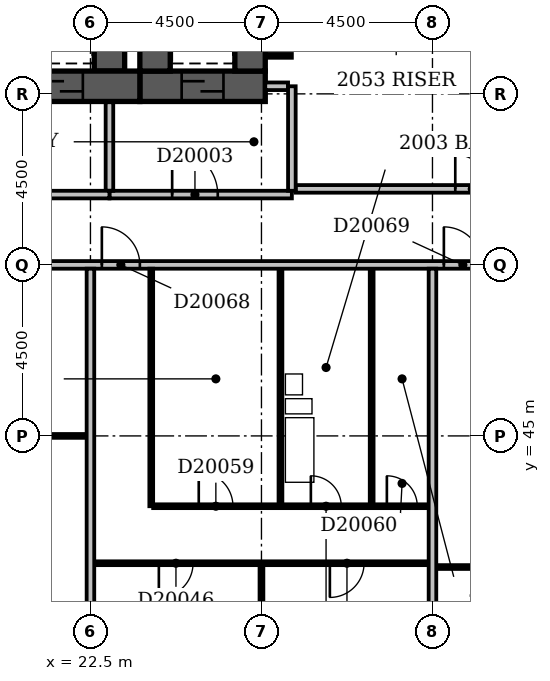
"""IFC4 building model, lengths in metres.
Left out: names, types, materials, properties, quantities, classifications, styles, units other than length and angle.
Written with IfcOpenShell. Run it as: python <this file> out.ifc"""

import sys

from ifc_helpers import new_model, si_unit, direction, frame, frame_2d, origin, place, context, subcontext, project, spatial, rectangle, extrude, element, fill, save


model = new_model("IFC4")
c1 = context("Model", 3, precision=1e-05, world=origin(), true_north=direction((0.0, 1.0)))
c2 = subcontext(c1, "Body", "Model", "MODEL_VIEW")
j1 = project(units=[si_unit("LENGTHUNIT", "METRE"), si_unit("PLANEANGLEUNIT", "RADIAN")], contexts=[c1])
p1 = place(None, origin())
s1 = spatial("IfcSite", under=j1, at=p1, CompositionType="ELEMENT")
p2 = place(p1, origin())
s2 = spatial("IfcBuilding", under=s1, at=p2, CompositionType="ELEMENT")
p3 = place(p2, frame((0.0, 0.0, 83.0)))
s3 = spatial("IfcBuildingStorey", under=s2, at=p3, CompositionType="ELEMENT", Elevation=83.0)
p4 = place(p3, frame((7.35, 54.2, -0.3), z_axis=(0.0, 0.0, 1.0), x_axis=(1.0, 0.0, 0.0)))
e1 = element("IfcWall", 1, at=p4, inside=s3, PredefinedType="SHEAR", context=c2, shape_type="SweptSolid", body=[
    extrude(rectangle(XDim=16.45, YDim=0.8, at=frame_2d((8.225, 0.0))), origin(), (0.0, 0.0, 1.0), 3.6),
])
p5 = place(p4, frame((1.35, 0.0, 0.3)))
e2 = element("IfcOpeningElement", 2, at=p5, cuts=e1, PredefinedType="OPENING", context=c2, shape_type="SweptSolid", body=[
    extrude(rectangle(XDim=1.1, YDim=2.1, at=frame_2d((0.55, 1.05))), frame((0.0, 0.412, 0.0), z_axis=(0.0, -1.0, 0.0), x_axis=(1.0, 0.0, 0.0)), (0.0, 0.0, 1.0), 0.824),
])
p6 = place(p4, frame((3.85, 0.0, 0.3)))
e3 = element("IfcOpeningElement", 3, at=p6, cuts=e1, PredefinedType="OPENING", context=c2, shape_type="SweptSolid", body=[
    extrude(rectangle(XDim=1.1, YDim=2.1, at=frame_2d((0.55, 1.05))), frame((0.0, 0.412, 0.0), z_axis=(0.0, -1.0, 0.0), x_axis=(1.0, 0.0, 0.0)), (0.0, 0.0, 1.0), 0.824),
])
p7 = place(p4, frame((6.35, 0.0, 0.3)))
e4 = element("IfcOpeningElement", 4, at=p7, cuts=e1, PredefinedType="OPENING", context=c2, shape_type="SweptSolid", body=[
    extrude(rectangle(XDim=1.1, YDim=2.1, at=frame_2d((0.55, 1.05))), frame((0.0, 0.412, 0.0), z_axis=(0.0, -1.0, 0.0), x_axis=(1.0, 0.0, 0.0)), (0.0, 0.0, 1.0), 0.824),
])
p8 = place(p4, frame((8.85, 0.0, 0.3)))
e5 = element("IfcOpeningElement", 5, at=p8, cuts=e1, PredefinedType="OPENING", context=c2, shape_type="SweptSolid", body=[
    extrude(rectangle(XDim=1.1, YDim=2.1, at=frame_2d((0.55, 1.05))), frame((0.0, 0.412, 0.0), z_axis=(0.0, -1.0, 0.0), x_axis=(1.0, 0.0, 0.0)), (0.0, 0.0, 1.0), 0.824),
])
p9 = place(p4, frame((11.35, 0.0, 0.3)))
e6 = element("IfcOpeningElement", 6, at=p9, cuts=e1, PredefinedType="OPENING", context=c2, shape_type="SweptSolid", body=[
    extrude(rectangle(XDim=1.1, YDim=2.1, at=frame_2d((0.55, 1.05))), frame((0.0, 0.412, 0.0), z_axis=(0.0, -1.0, 0.0), x_axis=(1.0, 0.0, 0.0)), (0.0, 0.0, 1.0), 0.824),
])
p10 = place(p4, frame((13.85, 0.0, 0.3)))
e7 = element("IfcOpeningElement", 7, at=p10, cuts=e1, PredefinedType="OPENING", context=c2, shape_type="SweptSolid", body=[
    extrude(rectangle(XDim=1.1, YDim=2.1, at=frame_2d((0.55, 1.05))), frame((0.0, 0.412, 0.0), z_axis=(0.0, -1.0, 0.0), x_axis=(1.0, 0.0, 0.0)), (0.0, 0.0, 1.0), 0.824),
])
p11 = place(p3, frame((23.0, 54.6, -0.3), z_axis=(0.0, 0.0, 1.0), x_axis=(0.0, 1.0, 0.0)))
e8 = element("IfcWall", 8, at=p11, inside=s3, PredefinedType="SHEAR", context=c2, shape_type="SweptSolid", body=[
    extrude(rectangle(XDim=3.0, YDim=0.8, at=frame_2d((1.5, 0.0))), origin(), (0.0, 0.0, 1.0), 3.6),
])
p12 = place(p3, frame((23.8, 54.2, -0.3), z_axis=(0.0, 0.0, 1.0), x_axis=(1.0, 0.0, 0.0)))
e9 = element("IfcWall", 9, at=p12, inside=s3, PredefinedType="SHEAR", context=c2, shape_type="SweptSolid", body=[
    extrude(rectangle(XDim=3.3, YDim=0.8, at=frame_2d((1.65, 0.0))), origin(), (0.0, 0.0, 1.0), 3.6),
])
p13 = place(p12, frame((1.1, 0.0, 0.3)))
e10 = element("IfcOpeningElement", 10, at=p13, cuts=e9, PredefinedType="OPENING", context=c2, shape_type="SweptSolid", body=[
    extrude(rectangle(XDim=1.1, YDim=2.1, at=frame_2d((0.55, 1.05))), frame((0.0, 0.412, 0.0), z_axis=(0.0, -1.0, 0.0), x_axis=(1.0, 0.0, 0.0)), (0.0, 0.0, 1.0), 0.824),
])
for number, where, z_axis, x_axis in (
    (11, (24.2, 54.6, -0.3), (0.0, 0.0, 1.0), (0.0, 1.0, 0.0)),
    (12, (26.7, 54.6, -0.3), (0.0, 0.0, 1.0), (0.0, 1.0, 0.0)),
):
    element("IfcWall", number, at=place(p3, frame(where, z_axis=z_axis, x_axis=x_axis)), inside=s3, PredefinedType="SHEAR", context=c2, shape_type="SweptSolid", body=[
        extrude(rectangle(XDim=3.0, YDim=0.8, at=frame_2d((1.5, 0.0))), origin(), (0.0, 0.0, 1.0), 3.6),
    ])
p14 = place(p3, frame((8.0, 51.35, 0.0), z_axis=(0.0, 0.0, 1.0), x_axis=(1.0, 0.0, 0.0)))
e13 = element("IfcWall", 13, at=p14, inside=s3, PredefinedType="PARTITIONING", context=c2, shape_type="SweptSolid", body=[
    extrude(rectangle(XDim=15.0, YDim=0.2, at=frame_2d((7.5, 0.0))), origin(), (0.0, 0.0, 1.0), 3.3),
])
p15 = place(p14, frame((3.4, 0.0, 0.0)))
e14 = element("IfcOpeningElement", 14, at=p15, cuts=e13, PredefinedType="OPENING", context=c2, shape_type="SweptSolid", body=[
    extrude(rectangle(XDim=1.2, YDim=2.1, at=frame_2d((0.6, 1.05))), frame((0.0, 0.112, 0.0), z_axis=(0.0, -1.0, 0.0), x_axis=(1.0, 0.0, 0.0)), (0.0, 0.0, 1.0), 0.224),
])
p16 = place(p14, frame((9.4, 0.0, 0.0)))
e15 = element("IfcOpeningElement", 15, at=p16, cuts=e13, PredefinedType="OPENING", context=c2, shape_type="SweptSolid", body=[
    extrude(rectangle(XDim=1.2, YDim=2.1, at=frame_2d((0.6, 1.05))), frame((0.0, 0.112, 0.0), z_axis=(0.0, -1.0, 0.0), x_axis=(1.0, 0.0, 0.0)), (0.0, 0.0, 1.0), 0.224),
])
p17 = place(p3, frame((23.0, 51.45, 0.0), z_axis=(0.0, 0.0, 1.0), x_axis=(0.0, 1.0, 0.0)))
e16 = element("IfcWall", 16, at=p17, inside=s3, PredefinedType="PARTITIONING", context=c2, shape_type="SweptSolid", body=[
    extrude(rectangle(XDim=2.33, YDim=0.2, at=frame_2d((1.165, 0.0))), origin(), (0.0, 0.0, 1.0), 3.3),
])
p18 = place(p3, frame((23.0, 51.35, 0.0), z_axis=(0.0, 0.0, 1.0), x_axis=(1.0, 0.0, 0.0)))
e17 = element("IfcWall", 17, at=p18, inside=s3, PredefinedType="PARTITIONING", context=c2, shape_type="SweptSolid", body=[
    extrude(rectangle(XDim=4.8, YDim=0.2, at=frame_2d((2.4, 0.0))), origin(), (0.0, 0.0, 1.0), 3.3),
])
p19 = place(p18, frame((1.65, 0.0, 0.0)))
e18 = element("IfcOpeningElement", 18, at=p19, cuts=e17, PredefinedType="OPENING", context=c2, shape_type="SweptSolid", body=[
    extrude(rectangle(XDim=1.2, YDim=2.1, at=frame_2d((0.6, 1.05))), frame((0.0, 0.112, 0.0), z_axis=(0.0, -1.0, 0.0), x_axis=(1.0, 0.0, 0.0)), (0.0, 0.0, 1.0), 0.224),
])
p20 = place(p3, frame((27.8, 51.45, 0.0), z_axis=(0.0, 0.0, 1.0), x_axis=(0.0, 1.0, 0.0)))
e19 = element("IfcWall", 19, at=p20, inside=s3, PredefinedType="PARTITIONING", context=c2, shape_type="SweptSolid", body=[
    extrude(rectangle(XDim=2.75, YDim=0.2, at=frame_2d((1.375, 0.0))), origin(), (0.0, 0.0, 1.0), 3.3),
])
p21 = place(p3, frame((27.1, 54.2, 0.0), z_axis=(0.0, 0.0, 1.0), x_axis=(1.0, 0.0, 0.0)))
e20 = element("IfcWall", 20, at=p21, inside=s3, PredefinedType="PARTITIONING", context=c2, shape_type="SweptSolid", body=[
    extrude(rectangle(XDim=0.6, YDim=0.2, at=frame_2d((0.3, 0.0))), origin(), (0.0, 0.0, 1.0), 3.3),
])
p22 = place(p3, frame((22.5, 36.6, 0.0), z_axis=(0.0, 0.0, 1.0), x_axis=(0.0, 1.0, 0.0)))
e21 = element("IfcWall", 21, at=p22, inside=s3, PredefinedType="PARTITIONING", context=c2, shape_type="SweptSolid", body=[
    extrude(rectangle(XDim=12.8, YDim=0.2, at=frame_2d((6.4, 0.0))), origin(), (0.0, 0.0, 1.0), 3.3),
])
p23 = place(p3, frame((27.0, 36.6, 0.0), z_axis=(0.0, 0.0, 1.0), x_axis=(0.0, 1.0, 0.0)))
e22 = element("IfcWall", 22, at=p23, inside=s3, PredefinedType="PARTITIONING", context=c2, shape_type="SweptSolid", body=[
    extrude(rectangle(XDim=5.0, YDim=0.1, at=frame_2d((2.5, 0.0))), origin(), (0.0, 0.0, 1.0), 2.6),
])
p24 = place(p3, frame((31.5, 36.6, 0.0), z_axis=(0.0, 0.0, 1.0), x_axis=(0.0, 1.0, 0.0)))
e23 = element("IfcWall", 23, at=p24, inside=s3, PredefinedType="PARTITIONING", context=c2, shape_type="SweptSolid", body=[
    extrude(rectangle(XDim=12.8, YDim=0.2, at=frame_2d((6.4, 0.0))), origin(), (0.0, 0.0, 1.0), 3.3),
])
p25 = place(p3, frame((31.6, 41.55, 0.0), z_axis=(0.0, 0.0, 1.0), x_axis=(1.0, 0.0, 0.0)))
e24 = element("IfcWall", 24, at=p25, inside=s3, PredefinedType="PARTITIONING", context=c2, shape_type="SweptSolid", body=[
    extrude(rectangle(XDim=13.3, YDim=0.1, at=frame_2d((6.65, 0.0))), origin(), (0.0, 0.0, 1.0), 3.3),
])
p26 = place(p25, frame((3.9, 0.0, 0.0)))
e25 = element("IfcOpeningElement", 25, at=p26, cuts=e24, PredefinedType="OPENING", context=c2, shape_type="SweptSolid", body=[
    extrude(rectangle(XDim=0.9, YDim=2.1, at=frame_2d((0.45, 1.05))), frame((0.0, 0.062, 0.0), z_axis=(0.0, -1.0, 0.0), x_axis=(1.0, 0.0, 0.0)), (0.0, 0.0, 1.0), 0.124),
])
p27 = place(p25, frame((10.7, 0.0, 0.0)))
e26 = element("IfcOpeningElement", 26, at=p27, cuts=e24, PredefinedType="OPENING", context=c2, shape_type="SweptSolid", body=[
    extrude(rectangle(XDim=0.9, YDim=2.1, at=frame_2d((0.45, 1.05))), frame((0.0, 0.062, 0.0), z_axis=(0.0, -1.0, 0.0), x_axis=(1.0, 0.0, 0.0)), (0.0, 0.0, 1.0), 0.124),
])
p28 = place(p3, frame((22.6, 41.65, 0.0), z_axis=(0.0, 0.0, 1.0), x_axis=(1.0, 0.0, 0.0)))
e27 = element("IfcWall", 27, at=p28, inside=s3, PredefinedType="PARTITIONING", context=c2, shape_type="SweptSolid", body=[
    extrude(rectangle(XDim=8.8, YDim=0.1, at=frame_2d((4.4, 0.0))), origin(), (0.0, 0.0, 1.0), 3.3),
])
p29 = place(p28, frame((1.7, 0.0, 0.0)))
e28 = element("IfcOpeningElement", 28, at=p29, cuts=e27, PredefinedType="OPENING", context=c2, shape_type="SweptSolid", body=[
    extrude(rectangle(XDim=0.9, YDim=2.1, at=frame_2d((0.45, 1.05))), frame((0.0, 0.062, 0.0), z_axis=(0.0, -1.0, 0.0), x_axis=(1.0, 0.0, 0.0)), (0.0, 0.0, 1.0), 0.124),
])
p30 = place(p28, frame((6.2, 0.0, 0.0)))
e29 = element("IfcOpeningElement", 29, at=p30, cuts=e27, PredefinedType="OPENING", context=c2, shape_type="SweptSolid", body=[
    extrude(rectangle(XDim=0.9, YDim=2.1, at=frame_2d((0.45, 1.05))), frame((0.0, 0.062, 0.0), z_axis=(0.0, -1.0, 0.0), x_axis=(1.0, 0.0, 0.0)), (0.0, 0.0, 1.0), 0.124),
])
p31 = place(p3, frame((24.1, 43.15, 0.0), z_axis=(0.0, 0.0, 1.0), x_axis=(0.0, 1.0, 0.0)))
e30 = element("IfcWall", 30, at=p31, inside=s3, PredefinedType="PARTITIONING", context=c2, shape_type="SweptSolid", body=[
    extrude(rectangle(XDim=6.25, YDim=0.1, at=frame_2d((3.125, 0.0))), origin(), (0.0, 0.0, 1.0), 3.3),
])
p32 = place(p3, frame((24.15, 43.15, 0.0), z_axis=(0.0, 0.0, 1.0), x_axis=(1.0, 0.0, 0.0)))
e31 = element("IfcWall", 31, at=p32, inside=s3, PredefinedType="PARTITIONING", context=c2, shape_type="SweptSolid", body=[
    extrude(rectangle(XDim=7.25, YDim=0.1, at=frame_2d((3.625, 0.0))), origin(), (0.0, 0.0, 1.0), 3.3),
])
p33 = place(p32, frame((4.15, 0.0, 0.0)))
e32 = element("IfcOpeningElement", 32, at=p33, cuts=e31, PredefinedType="OPENING", context=c2, shape_type="SweptSolid", body=[
    extrude(rectangle(XDim=0.8, YDim=2.1, at=frame_2d((0.4, 1.05))), frame((0.0, 0.062, 0.0), z_axis=(0.0, -1.0, 0.0), x_axis=(1.0, 0.0, 0.0)), (0.0, 0.0, 1.0), 0.124),
])
p34 = place(p32, frame((1.2, 0.0, 0.0)))
e33 = element("IfcOpeningElement", 33, at=p34, cuts=e31, PredefinedType="OPENING", context=c2, shape_type="SweptSolid", body=[
    extrude(rectangle(XDim=0.9, YDim=2.1, at=frame_2d((0.45, 1.05))), frame((0.0, 0.062, 0.0), z_axis=(0.0, -1.0, 0.0), x_axis=(1.0, 0.0, 0.0)), (0.0, 0.0, 1.0), 0.124),
])
p35 = place(p32, frame((6.15, 0.0, 0.0)))
e34 = element("IfcOpeningElement", 34, at=p35, cuts=e31, PredefinedType="OPENING", context=c2, shape_type="SweptSolid", body=[
    extrude(rectangle(XDim=0.8, YDim=2.1, at=frame_2d((0.4, 1.05))), frame((0.0, 0.062, 0.0), z_axis=(0.0, -1.0, 0.0), x_axis=(1.0, 0.0, 0.0)), (0.0, 0.0, 1.0), 0.124),
])
p36 = place(p3, frame((27.5, 43.2, 0.0), z_axis=(0.0, 0.0, 1.0), x_axis=(0.0, 1.0, 0.0)))
e35 = element("IfcWall", 35, at=p36, inside=s3, PredefinedType="PLUMBINGWALL", context=c2, shape_type="SweptSolid", body=[
    extrude(rectangle(XDim=6.2, YDim=0.1, at=frame_2d((3.1, 0.0))), origin(), (0.0, 0.0, 1.0), 2.6),
])
p37 = place(p3, frame((29.9, 43.2, 0.0), z_axis=(0.0, 0.0, 1.0), x_axis=(0.0, 1.0, 0.0)))
e36 = element("IfcWall", 36, at=p37, inside=s3, PredefinedType="PLUMBINGWALL", context=c2, shape_type="SweptSolid", body=[
    extrude(rectangle(XDim=6.2, YDim=0.1, at=frame_2d((3.1, 0.0))), origin(), (0.0, 0.0, 1.0), 3.3),
])
p38 = place(p3, frame((9.1, 45.0, 0.0), z_axis=(0.0, 0.0, 1.0), x_axis=(1.0, 0.0, 0.0)))
e37 = element("IfcWall", 37, at=p38, inside=s3, PredefinedType="PARTITIONING", context=c2, shape_type="SweptSolid", body=[
    extrude(rectangle(XDim=13.3, YDim=0.1, at=frame_2d((6.65, 0.0))), origin(), (0.0, 0.0, 1.0), 3.3),
])
p39 = place(p3, frame((9.1, 49.5, 0.0), z_axis=(0.0, 0.0, 1.0), x_axis=(1.0, 0.0, 0.0)))
e38 = element("IfcWall", 38, at=p39, inside=s3, PredefinedType="PARTITIONING", context=c2, shape_type="SweptSolid", body=[
    extrude(rectangle(XDim=57.8, YDim=0.2, at=frame_2d((28.9, 0.0))), origin(), (0.0, 0.0, 1.0), 3.3),
])
p40 = place(p39, frame((13.7, 0.0, 0.0)))
e39 = element("IfcOpeningElement", 39, at=p40, cuts=e38, PredefinedType="OPENING", context=c2, shape_type="SweptSolid", body=[
    extrude(rectangle(XDim=1.0, YDim=2.1, at=frame_2d((0.5, 1.05))), frame((0.0, 0.112, 0.0), z_axis=(0.0, -1.0, 0.0), x_axis=(1.0, 0.0, 0.0)), (0.0, 0.0, 1.0), 0.224),
])
p41 = place(p39, frame((22.7, 0.0, 0.0)))
e40 = element("IfcOpeningElement", 40, at=p41, cuts=e38, PredefinedType="OPENING", context=c2, shape_type="SweptSolid", body=[
    extrude(rectangle(XDim=1.0, YDim=2.1, at=frame_2d((0.5, 1.05))), frame((0.0, 0.112, 0.0), z_axis=(0.0, -1.0, 0.0), x_axis=(1.0, 0.0, 0.0)), (0.0, 0.0, 1.0), 0.224),
])
p42 = place(p39, frame((38.6, 0.0, 0.0)))
e41 = element("IfcOpeningElement", 41, at=p42, cuts=e38, PredefinedType="OPENING", context=c2, shape_type="SweptSolid", body=[
    extrude(rectangle(XDim=1.0, YDim=2.1, at=frame_2d((0.5, 1.05))), frame((0.0, 0.112, 0.0), z_axis=(0.0, -1.0, 0.0), x_axis=(1.0, 0.0, 0.0)), (0.0, 0.0, 1.0), 0.224),
])
p43 = place(p39, frame((55.45, 0.0, 0.0)))
e42 = element("IfcOpeningElement", 42, at=p43, cuts=e38, PredefinedType="OPENING", context=c2, shape_type="SweptSolid", body=[
    extrude(rectangle(XDim=1.0, YDim=2.1, at=frame_2d((0.5, 1.05))), frame((0.0, 0.112, 0.0), z_axis=(0.0, -1.0, 0.0), x_axis=(1.0, 0.0, 0.0)), (0.0, 0.0, 1.0), 0.224),
])
p44 = place(p39, frame((6.15, 0.0, 0.0)))
e43 = element("IfcOpeningElement", 43, at=p44, cuts=e38, PredefinedType="OPENING", context=c2, shape_type="SweptSolid", body=[
    extrude(rectangle(XDim=0.9, YDim=2.1, at=frame_2d((0.45, 1.05))), frame((0.0, 0.112, 0.0), z_axis=(0.0, -1.0, 0.0), x_axis=(1.0, 0.0, 0.0)), (0.0, 0.0, 1.0), 0.224),
])
p45 = place(p3, frame((27.9, 51.5, 0.0), z_axis=(0.0, 0.0, 1.0), x_axis=(1.0, 0.0, 0.0)))
e44 = element("IfcWall", 44, at=p45, inside=s3, PredefinedType="PARTITIONING", context=c2, shape_type="SweptSolid", body=[
    extrude(rectangle(XDim=9.3, YDim=0.2, at=frame_2d((4.65, 0.0))), origin(), (0.0, 0.0, 1.0), 3.3),
])
p46 = place(p45, frame((4.2, 0.0, 0.0)))
e45 = element("IfcOpeningElement", 45, at=p46, cuts=e44, PredefinedType="OPENING", context=c2, shape_type="SweptSolid", body=[
    extrude(rectangle(XDim=0.9, YDim=2.1, at=frame_2d((0.45, 1.05))), frame((0.0, 0.112, 0.0), z_axis=(0.0, -1.0, 0.0), x_axis=(1.0, 0.0, 0.0)), (0.0, 0.0, 1.0), 0.224),
])
p47 = place(p3, frame((27.1, 55.0, 0.0), z_axis=(0.0, 0.0, 1.0), x_axis=(1.0, 0.0, 0.0)))
e46 = element("IfcWall", 46, at=p47, inside=s3, PredefinedType="PARTITIONING", context=c2, shape_type="SweptSolid", body=[
    extrude(rectangle(XDim=0.7, YDim=0.1, at=frame_2d((0.35, 0.0))), origin(), (0.0, 0.0, 1.0), 3.3),
])
p48 = place(p19, origin())
e47 = element("IfcDoor", 47, at=p48, inside=s3, OperationType="SINGLE_SWING_LEFT", PredefinedType="DOOR", context=c2, shape_type="SweptSolid", body=[
    extrude(rectangle(XDim=1.2, YDim=2.1, at=frame_2d((0.6, 1.05))), frame((0.0, 0.025, 0.0), z_axis=(0.0, -1.0, 0.0), x_axis=(1.0, 0.0, 0.0)), (0.0, 0.0, 1.0), 0.05),
])
fill(e18, e47)
p49 = place(p13, origin())
e48 = element("IfcDoor", 48, at=p49, inside=s3, OperationType="SLIDING_TO_LEFT", PredefinedType="DOOR", context=c2, shape_type="SweptSolid", body=[
    extrude(rectangle(XDim=1.1, YDim=2.1, at=frame_2d((0.55, 1.05))), frame((0.0, 0.025, 0.0), z_axis=(0.0, -1.0, 0.0), x_axis=(1.0, 0.0, 0.0)), (0.0, 0.0, 1.0), 0.05),
])
fill(e10, e48)
p50 = place(p10, origin())
e49 = element("IfcDoor", 49, at=p50, inside=s3, OperationType="SLIDING_TO_LEFT", PredefinedType="DOOR", context=c2, shape_type="SweptSolid", body=[
    extrude(rectangle(XDim=1.1, YDim=2.1, at=frame_2d((0.55, 1.05))), frame((0.0, 0.025, 0.0), z_axis=(0.0, -1.0, 0.0), x_axis=(1.0, 0.0, 0.0)), (0.0, 0.0, 1.0), 0.05),
])
fill(e7, e49)
p51 = place(p29, frame((0.9, 0.0, 0.0), z_axis=(0.0, 0.0, 1.0), x_axis=(-1.0, 0.0, 0.0)))
e50 = element("IfcDoor", 50, at=p51, inside=s3, OperationType="SINGLE_SWING_RIGHT", PredefinedType="DOOR", context=c2, shape_type="SweptSolid", body=[
    extrude(rectangle(XDim=0.9, YDim=2.1, at=frame_2d((0.45, 1.05))), frame((0.0, 0.025, 0.0), z_axis=(0.0, -1.0, 0.0), x_axis=(1.0, 0.0, 0.0)), (0.0, 0.0, 1.0), 0.05),
])
fill(e28, e50)
p52 = place(p30, frame((0.9, 0.0, 0.0), z_axis=(0.0, 0.0, 1.0), x_axis=(-1.0, 0.0, 0.0)))
e51 = element("IfcDoor", 51, at=p52, inside=s3, OperationType="SINGLE_SWING_RIGHT", PredefinedType="DOOR", context=c2, shape_type="SweptSolid", body=[
    extrude(rectangle(XDim=0.9, YDim=2.1, at=frame_2d((0.45, 1.05))), frame((0.0, 0.025, 0.0), z_axis=(0.0, -1.0, 0.0), x_axis=(1.0, 0.0, 0.0)), (0.0, 0.0, 1.0), 0.05),
])
fill(e29, e51)
p53 = place(p33, origin())
e52 = element("IfcDoor", 52, at=p53, inside=s3, OperationType="SINGLE_SWING_LEFT", PredefinedType="DOOR", context=c2, shape_type="SweptSolid", body=[
    extrude(rectangle(XDim=0.8, YDim=2.1, at=frame_2d((0.4, 1.05))), frame((0.0, 0.025, 0.0), z_axis=(0.0, -1.0, 0.0), x_axis=(1.0, 0.0, 0.0)), (0.0, 0.0, 1.0), 0.05),
])
fill(e32, e52)
p54 = place(p34, origin())
e53 = element("IfcDoor", 53, at=p54, inside=s3, OperationType="SINGLE_SWING_LEFT", PredefinedType="DOOR", context=c2, shape_type="SweptSolid", body=[
    extrude(rectangle(XDim=0.9, YDim=2.1, at=frame_2d((0.45, 1.05))), frame((0.0, 0.025, 0.0), z_axis=(0.0, -1.0, 0.0), x_axis=(1.0, 0.0, 0.0)), (0.0, 0.0, 1.0), 0.05),
])
fill(e33, e53)
p55 = place(p35, origin())
e54 = element("IfcDoor", 54, at=p55, inside=s3, OperationType="SINGLE_SWING_LEFT", PredefinedType="DOOR", context=c2, shape_type="SweptSolid", body=[
    extrude(rectangle(XDim=0.8, YDim=2.1, at=frame_2d((0.4, 1.05))), frame((0.0, 0.025, 0.0), z_axis=(0.0, -1.0, 0.0), x_axis=(1.0, 0.0, 0.0)), (0.0, 0.0, 1.0), 0.05),
])
fill(e34, e54)
p56 = place(p40, origin())
e55 = element("IfcDoor", 55, at=p56, inside=s3, OperationType="SINGLE_SWING_LEFT", PredefinedType="DOOR", context=c2, shape_type="SweptSolid", body=[
    extrude(rectangle(XDim=1.0, YDim=2.1, at=frame_2d((0.5, 1.05))), frame((0.0, 0.025, 0.0), z_axis=(0.0, -1.0, 0.0), x_axis=(1.0, 0.0, 0.0)), (0.0, 0.0, 1.0), 0.05),
])
fill(e39, e55)
p57 = place(p41, origin())
e56 = element("IfcDoor", 56, at=p57, inside=s3, OperationType="SINGLE_SWING_LEFT", PredefinedType="DOOR", context=c2, shape_type="SweptSolid", body=[
    extrude(rectangle(XDim=1.0, YDim=2.1, at=frame_2d((0.5, 1.05))), frame((0.0, 0.025, 0.0), z_axis=(0.0, -1.0, 0.0), x_axis=(1.0, 0.0, 0.0)), (0.0, 0.0, 1.0), 0.05),
])
fill(e40, e56)
p58 = place(p46, origin())
e57 = element("IfcDoor", 57, at=p58, inside=s3, OperationType="SINGLE_SWING_LEFT", PredefinedType="DOOR", context=c2, shape_type="SweptSolid", body=[
    extrude(rectangle(XDim=0.9, YDim=2.1, at=frame_2d((0.45, 1.05))), frame((0.0, 0.025, 0.0), z_axis=(0.0, -1.0, 0.0), x_axis=(1.0, 0.0, 0.0)), (0.0, 0.0, 1.0), 0.05),
])
fill(e45, e57)
save(model, sys.argv[1])
